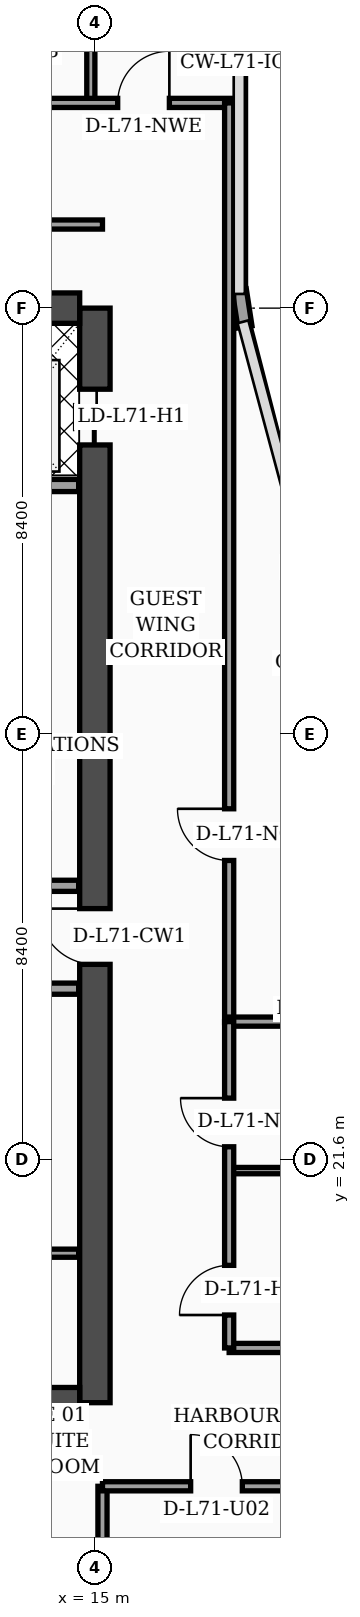
"""IFC4 building model, lengths in metres.
Left out: names, types, materials, properties, quantities, classifications, styles, units other than length and angle.
Written with IfcOpenShell. Run it as: python <this file> out.ifc"""

import sys

from ifc_helpers import new_model, si_unit, direction, frame, frame_2d, origin, place, context, subcontext, project, spatial, rectangle, extrude, element, fill, save


model = new_model("IFC4")
c1 = context("Model", 3, precision=1e-05, world=origin(), true_north=direction((0.0, 1.0)))
c2 = subcontext(c1, "Body", "Model", "MODEL_VIEW")
j1 = project(units=[si_unit("LENGTHUNIT", "METRE"), si_unit("PLANEANGLEUNIT", "RADIAN")], contexts=[c1])
p1 = place(None, origin())
s1 = spatial("IfcSite", under=j1, at=p1, CompositionType="ELEMENT")
p2 = place(p1, origin())
s2 = spatial("IfcBuilding", under=s1, at=p2, CompositionType="ELEMENT")
p3 = place(p2, frame((0.0, 0.0, 287.3)))
s3 = spatial("IfcBuildingStorey", under=s2, at=p3, CompositionType="ELEMENT", Elevation=287.3)
p4 = place(p3, frame((15.0, 16.8, 0.0), z_axis=(0.0, 0.0, 1.0), x_axis=(0.0, 1.0, 0.0)))
e1 = element("IfcWall", 1, at=p4, inside=s3, PredefinedType="SHEAR", context=c2, shape_type="SweptSolid", body=[
    extrude(rectangle(XDim=21.6, YDim=0.6, at=frame_2d((10.8, 0.0))), origin(), (0.0, 0.0, 1.0), 3.56),
])
p5 = place(p4, frame((8.65, 0.0, 0.0)))
e2 = element("IfcOpeningElement", 2, at=p5, cuts=e1, PredefinedType="OPENING", context=c2, shape_type="SweptSolid", body=[
    extrude(rectangle(XDim=1.1, YDim=2.2, at=frame_2d((0.55, 1.1))), frame((0.0, 0.31, 0.0), z_axis=(0.0, -1.0, 0.0), x_axis=(1.0, 0.0, 0.0)), (0.0, 0.0, 1.0), 0.62),
])
p6 = place(p4, frame((18.9, 0.0, 0.0)))
e3 = element("IfcOpeningElement", 3, at=p6, cuts=e1, PredefinedType="OPENING", context=c2, shape_type="SweptSolid", body=[
    extrude(rectangle(XDim=1.1, YDim=2.2, at=frame_2d((0.55, 1.1))), frame((0.0, 0.31, 0.0), z_axis=(0.0, -1.0, 0.0), x_axis=(1.0, 0.0, 0.0)), (0.0, 0.0, 1.0), 0.62),
])
p7 = place(p3, frame((4.5, 38.4, 0.0), z_axis=(0.0, 0.0, 1.0), x_axis=(1.0, 0.0, 0.0)))
e4 = element("IfcWall", 4, at=p7, inside=s3, PredefinedType="SHEAR", context=c2, shape_type="SweptSolid", body=[
    extrude(rectangle(XDim=10.2, YDim=0.6, at=frame_2d((5.1, 0.0))), origin(), (0.0, 0.0, 1.0), 3.56),
])
p8 = place(p7, frame((5.8, 0.0, 0.0)))
e5 = element("IfcOpeningElement", 5, at=p8, cuts=e4, PredefinedType="OPENING", context=c2, shape_type="SweptSolid", body=[
    extrude(rectangle(XDim=1.1, YDim=2.2, at=frame_2d((0.55, 1.1))), frame((0.0, 0.31, 0.0), z_axis=(0.0, -1.0, 0.0), x_axis=(1.0, 0.0, 0.0)), (0.0, 0.0, 1.0), 0.62),
])
p9 = place(p3, frame((4.5, 16.8, 0.0), z_axis=(0.0, 0.0, 1.0), x_axis=(1.0, 0.0, 0.0)))
e6 = element("IfcWall", 6, at=p9, inside=s3, PredefinedType="SHEAR", context=c2, shape_type="SweptSolid", body=[
    extrude(rectangle(XDim=10.2, YDim=0.6, at=frame_2d((5.1, 0.0))), origin(), (0.0, 0.0, 1.0), 3.56),
])
p10 = place(p3, frame((17.962, 38.03, 0.0), z_axis=(0.0, 0.0, 1.0), x_axis=(-0.15141125477, 0.988470855377, 0.0)))
e7 = element("IfcWall", 7, at=p10, inside=s3, PredefinedType="SOLIDWALL", context=c2, shape_type="SweptSolid", body=[
    extrude(rectangle(XDim=0.739, YDim=0.28, at=frame_2d((0.369, 0.0))), origin(), (0.0, 0.0, 1.0), 3.56),
])
p11 = place(p3, frame((9.68, 19.75, 0.0), z_axis=(0.0, 0.0, 1.0), x_axis=(1.0, 0.0, 0.0)))
e8 = element("IfcWall", 8, at=p11, inside=s3, PredefinedType="PARTITIONING", context=c2, shape_type="SweptSolid", body=[
    extrude(rectangle(XDim=5.0, YDim=0.16, at=frame_2d((2.5, 0.0))), origin(), (0.0, 0.0, 1.0), 3.56),
])
p12 = place(p11, frame((1.1, 0.0, 0.0)))
e9 = element("IfcOpeningElement", 9, at=p12, cuts=e8, PredefinedType="OPENING", context=c2, shape_type="SweptSolid", body=[
    extrude(rectangle(XDim=0.98, YDim=2.15, at=frame_2d((0.49, 1.075))), frame((0.0, 0.09, 0.0), z_axis=(0.0, -1.0, 0.0), x_axis=(1.0, 0.0, 0.0)), (0.0, 0.0, 1.0), 0.18),
])
p13 = place(p3, frame((9.68, 24.97, 0.0), z_axis=(0.0, 0.0, 1.0), x_axis=(1.0, 0.0, 0.0)))
e10 = element("IfcWall", 10, at=p13, inside=s3, PredefinedType="SOLIDWALL", context=c2, shape_type="SweptSolid", body=[
    extrude(rectangle(XDim=5.0, YDim=0.22, at=frame_2d((2.5, 0.0))), origin(), (0.0, 0.0, 1.0), 2.99),
])
p14 = place(p13, frame((0.9, 0.0, 0.0)))
e11 = element("IfcOpeningElement", 11, at=p14, cuts=e10, PredefinedType="OPENING", context=c2, shape_type="SweptSolid", body=[
    extrude(rectangle(XDim=0.98, YDim=2.15, at=frame_2d((0.49, 1.075))), frame((0.0, 0.12, 0.0), z_axis=(0.0, -1.0, 0.0), x_axis=(1.0, 0.0, 0.0)), (0.0, 0.0, 1.0), 0.24),
])
p15 = place(p3, frame((12.25, 27.0, 0.0), z_axis=(0.0, 0.0, 1.0), x_axis=(1.0, 0.0, 0.0)))
e12 = element("IfcWall", 12, at=p15, inside=s3, PredefinedType="SOLIDWALL", context=c2, shape_type="SweptSolid", body=[
    extrude(rectangle(XDim=2.43, YDim=0.22, at=frame_2d((1.215, 0.0))), origin(), (0.0, 0.0, 1.0), 3.56),
])
p16 = place(p3, frame((12.25, 29.8, 0.0), z_axis=(0.0, 0.0, 1.0), x_axis=(1.0, 0.0, 0.0)))
e13 = element("IfcWall", 13, at=p16, inside=s3, PredefinedType="PARTITIONING", context=c2, shape_type="SweptSolid", body=[
    extrude(rectangle(XDim=2.43, YDim=0.16, at=frame_2d((1.215, 0.0))), origin(), (0.0, 0.0, 1.0), 3.56),
])
p17 = place(p16, frame((0.55, 0.0, 0.0)))
e14 = element("IfcOpeningElement", 14, at=p17, cuts=e13, PredefinedType="OPENING", context=c2, shape_type="SweptSolid", body=[
    extrude(rectangle(XDim=0.98, YDim=2.15, at=frame_2d((0.49, 1.075))), frame((0.0, 0.09, 0.0), z_axis=(0.0, -1.0, 0.0), x_axis=(1.0, 0.0, 0.0)), (0.0, 0.0, 1.0), 0.18),
])
p18 = place(p3, frame((9.66, 34.9, 0.0), z_axis=(0.0, 0.0, 1.0), x_axis=(1.0, 0.0, 0.0)))
e15 = element("IfcWall", 15, at=p18, inside=s3, PredefinedType="SOLIDWALL", context=c2, shape_type="SweptSolid", body=[
    extrude(rectangle(XDim=5.02, YDim=0.24, at=frame_2d((2.51, 0.0))), origin(), (0.0, 0.0, 1.0), 3.56),
])
p19 = place(p3, frame((15.15, 2.44, 0.0), z_axis=(0.0, 0.0, 1.0), x_axis=(0.0, 1.0, 0.0)))
e16 = element("IfcWall", 16, at=p19, inside=s3, PredefinedType="PARTITIONING", context=c2, shape_type="SweptSolid", body=[
    extrude(rectangle(XDim=12.71, YDim=0.18, at=frame_2d((6.355, 0.0))), origin(), (0.0, 0.0, 1.0), 3.09),
])
p20 = place(p3, frame((15.15, 15.15, 0.0), z_axis=(0.0, 0.0, 1.0), x_axis=(1.0, 0.0, 0.0)))
e17 = element("IfcWall", 17, at=p20, inside=s3, PredefinedType="PARTITIONING", context=c2, shape_type="SweptSolid", body=[
    extrude(rectangle(XDim=6.45, YDim=0.18, at=frame_2d((3.225, 0.0))), origin(), (0.0, 0.0, 1.0), 2.59),
])
p21 = place(p20, frame((1.74, 0.0, 0.0)))
e18 = element("IfcOpeningElement", 18, at=p21, cuts=e17, PredefinedType="OPENING", context=c2, shape_type="SweptSolid", body=[
    extrude(rectangle(XDim=1.02, YDim=2.2, at=frame_2d((0.51, 1.1))), frame((0.0, 0.1, 0.0), z_axis=(0.0, -1.0, 0.0), x_axis=(1.0, 0.0, 0.0)), (0.0, 0.0, 1.0), 0.2),
])
p22 = place(p3, frame((14.92, 42.45, 0.0), z_axis=(0.0, 0.0, 1.0), x_axis=(0.0, 1.0, 0.0)))
e19 = element("IfcWall", 19, at=p22, inside=s3, PredefinedType="PARTITIONING", context=c2, shape_type="SweptSolid", body=[
    extrude(rectangle(XDim=5.35, YDim=0.16, at=frame_2d((2.675, 0.0))), origin(), (0.0, 0.0, 1.0), 3.09),
])
p23 = place(p3, frame((0.08, 42.45, 0.0), z_axis=(0.0, 0.0, 1.0), x_axis=(1.0, 0.0, 0.0)))
e20 = element("IfcWall", 20, at=p23, inside=s3, PredefinedType="PARTITIONING", context=c2, shape_type="SweptSolid", body=[
    extrude(rectangle(XDim=17.77, YDim=0.18, at=frame_2d((8.885, 0.0))), origin(), (0.0, 0.0, 1.0), 2.99),
])
p24 = place(p23, frame((0.9, 0.0, 0.0)))
e21 = element("IfcOpeningElement", 21, at=p24, cuts=e20, PredefinedType="OPENING", context=c2, shape_type="SweptSolid", body=[
    extrude(rectangle(XDim=1.02, YDim=2.2, at=frame_2d((0.51, 1.1))), frame((0.0, 0.1, 0.0), z_axis=(0.0, -1.0, 0.0), x_axis=(1.0, 0.0, 0.0)), (0.0, 0.0, 1.0), 0.2),
])
p25 = place(p23, frame((7.38, 0.0, 0.0)))
e22 = element("IfcOpeningElement", 22, at=p25, cuts=e20, PredefinedType="OPENING", context=c2, shape_type="SweptSolid", body=[
    extrude(rectangle(XDim=1.02, YDim=2.2, at=frame_2d((0.51, 1.1))), frame((0.0, 0.1, 0.0), z_axis=(0.0, -1.0, 0.0), x_axis=(1.0, 0.0, 0.0)), (0.0, 0.0, 1.0), 0.2),
])
p26 = place(p23, frame((15.37, 0.0, 0.0)))
e23 = element("IfcOpeningElement", 23, at=p26, cuts=e20, PredefinedType="OPENING", context=c2, shape_type="SweptSolid", body=[
    extrude(rectangle(XDim=1.02, YDim=2.2, at=frame_2d((0.51, 1.1))), frame((0.0, 0.1, 0.0), z_axis=(0.0, -1.0, 0.0), x_axis=(1.0, 0.0, 0.0)), (0.0, 0.0, 1.0), 0.2),
])
p27 = place(p3, frame((17.65, 24.3, 0.0), z_axis=(0.0, 0.0, 1.0), x_axis=(0.0, 1.0, 0.0)))
e24 = element("IfcWall", 24, at=p27, inside=s3, PredefinedType="PARTITIONING", context=c2, shape_type="SweptSolid", body=[
    extrude(rectangle(XDim=18.15, YDim=0.18, at=frame_2d((9.075, 0.0))), origin(), (0.0, 0.0, 1.0), 2.99),
])
p28 = place(p27, frame((3.2, 0.0, 0.0)))
e25 = element("IfcOpeningElement", 25, at=p28, cuts=e24, PredefinedType="OPENING", context=c2, shape_type="SweptSolid", body=[
    extrude(rectangle(XDim=1.02, YDim=2.2, at=frame_2d((0.51, 1.1))), frame((0.0, 0.1, 0.0), z_axis=(0.0, -1.0, 0.0), x_axis=(1.0, 0.0, 0.0)), (0.0, 0.0, 1.0), 0.2),
])
p29 = place(p3, frame((3.88, 40.05, 0.0), z_axis=(0.0, 0.0, 1.0), x_axis=(1.0, 0.0, 0.0)))
e26 = element("IfcWall", 26, at=p29, inside=s3, PredefinedType="PARTITIONING", context=c2, shape_type="SweptSolid", body=[
    extrude(rectangle(XDim=11.27, YDim=0.18, at=frame_2d((5.635, 0.0))), origin(), (0.0, 0.0, 1.0), 2.99),
])
p30 = place(p3, frame((17.65, 17.88, 0.0), z_axis=(0.0, 0.0, 1.0), x_axis=(1.0, 0.0, 0.0)))
e27 = element("IfcWall", 27, at=p30, inside=s3, PredefinedType="PARTITIONING", context=c2, shape_type="SweptSolid", body=[
    extrude(rectangle(XDim=3.9, YDim=0.18, at=frame_2d((1.95, 0.0))), origin(), (0.0, 0.0, 1.0), 3.56),
])
p31 = place(p3, frame((17.65, 21.38, 0.0), z_axis=(0.0, 0.0, 1.0), x_axis=(1.0, 0.0, 0.0)))
e28 = element("IfcWall", 28, at=p31, inside=s3, PredefinedType="PARTITIONING", context=c2, shape_type="SweptSolid", body=[
    extrude(rectangle(XDim=3.9, YDim=0.125, at=frame_2d((1.95, 0.0))), origin(), (0.0, 0.0, 1.0), 3.56),
])
p32 = place(p3, frame((17.65, 24.32, 0.0), z_axis=(0.0, 0.0, 1.0), x_axis=(1.0, 0.0, 0.0)))
e29 = element("IfcWall", 29, at=p32, inside=s3, PredefinedType="PARTITIONING", context=c2, shape_type="SweptSolid", body=[
    extrude(rectangle(XDim=3.95, YDim=0.18, at=frame_2d((1.975, 0.0))), origin(), (0.0, 0.0, 1.0), 3.56),
])
p33 = place(p3, frame((17.65, 17.88, 0.0), z_axis=(0.0, 0.0, 1.0), x_axis=(0.0, 1.0, 0.0)))
e30 = element("IfcWall", 30, at=p33, inside=s3, PredefinedType="PARTITIONING", context=c2, shape_type="SweptSolid", body=[
    extrude(rectangle(XDim=6.44, YDim=0.18, at=frame_2d((3.22, 0.0))), origin(), (0.0, 0.0, 1.0), 3.56),
])
p34 = place(p33, frame((0.65, 0.0, 0.0)))
e31 = element("IfcOpeningElement", 31, at=p34, cuts=e30, PredefinedType="OPENING", context=c2, shape_type="SweptSolid", body=[
    extrude(rectangle(XDim=0.98, YDim=2.15, at=frame_2d((0.49, 1.075))), frame((0.0, 0.1, 0.0), z_axis=(0.0, -1.0, 0.0), x_axis=(1.0, 0.0, 0.0)), (0.0, 0.0, 1.0), 0.2),
])
p35 = place(p33, frame((3.97, 0.0, 0.0)))
e32 = element("IfcOpeningElement", 32, at=p35, cuts=e30, PredefinedType="OPENING", context=c2, shape_type="SweptSolid", body=[
    extrude(rectangle(XDim=0.96, YDim=2.2, at=frame_2d((0.48, 1.1))), frame((0.0, 0.1, 0.0), z_axis=(0.0, -1.0, 0.0), x_axis=(1.0, 0.0, 0.0)), (0.0, 0.0, 1.0), 0.2),
])
p36 = place(p21, origin())
e33 = element("IfcDoor", 33, at=p36, inside=s3, OperationType="SINGLE_SWING_LEFT", PredefinedType="DOOR", context=c2, shape_type="SweptSolid", body=[
    extrude(rectangle(XDim=1.02, YDim=2.2, at=frame_2d((0.51, 1.1))), frame((0.0, 0.025, 0.0), z_axis=(0.0, -1.0, 0.0), x_axis=(1.0, 0.0, 0.0)), (0.0, 0.0, 1.0), 0.05),
])
fill(e18, e33)
p37 = place(p26, origin())
e34 = element("IfcDoor", 34, at=p37, inside=s3, OperationType="SINGLE_SWING_RIGHT", PredefinedType="DOOR", context=c2, shape_type="SweptSolid", body=[
    extrude(rectangle(XDim=1.02, YDim=2.2, at=frame_2d((0.51, 1.1))), frame((0.0, 0.025, 0.0), z_axis=(0.0, -1.0, 0.0), x_axis=(1.0, 0.0, 0.0)), (0.0, 0.0, 1.0), 0.05),
])
fill(e23, e34)
p38 = place(p28, origin())
e35 = element("IfcDoor", 35, at=p38, inside=s3, OperationType="SINGLE_SWING_RIGHT", PredefinedType="DOOR", context=c2, shape_type="SweptSolid", body=[
    extrude(rectangle(XDim=1.02, YDim=2.2, at=frame_2d((0.51, 1.1))), frame((0.0, 0.025, 0.0), z_axis=(0.0, -1.0, 0.0), x_axis=(1.0, 0.0, 0.0)), (0.0, 0.0, 1.0), 0.05),
])
fill(e25, e35)
p39 = place(p34, origin())
e36 = element("IfcDoor", 36, at=p39, inside=s3, OperationType="SINGLE_SWING_LEFT", PredefinedType="DOOR", context=c2, shape_type="SweptSolid", body=[
    extrude(rectangle(XDim=0.98, YDim=2.15, at=frame_2d((0.49, 1.075))), frame((0.0, 0.025, 0.0), z_axis=(0.0, -1.0, 0.0), x_axis=(1.0, 0.0, 0.0)), (0.0, 0.0, 1.0), 0.05),
])
fill(e31, e36)
p40 = place(p35, origin())
e37 = element("IfcDoor", 37, at=p40, inside=s3, OperationType="SINGLE_SWING_RIGHT", PredefinedType="DOOR", context=c2, shape_type="SweptSolid", body=[
    extrude(rectangle(XDim=0.96, YDim=2.2, at=frame_2d((0.48, 1.1))), frame((0.0, 0.025, 0.0), z_axis=(0.0, -1.0, 0.0), x_axis=(1.0, 0.0, 0.0)), (0.0, 0.0, 1.0), 0.05),
])
fill(e32, e37)
p41 = place(p5, origin())
e38 = element("IfcDoor", 38, at=p41, inside=s3, OperationType="SINGLE_SWING_RIGHT", PredefinedType="DOOR", context=c2, shape_type="SweptSolid", body=[
    extrude(rectangle(XDim=1.1, YDim=2.2, at=frame_2d((0.55, 1.1))), frame((0.0, 0.025, 0.0), z_axis=(0.0, -1.0, 0.0), x_axis=(1.0, 0.0, 0.0)), (0.0, 0.0, 1.0), 0.05),
])
fill(e2, e38)
p42 = place(p6, origin())
e39 = element("IfcDoor", 39, at=p42, inside=s3, OperationType="DOUBLE_DOOR_SLIDING", PredefinedType="DOOR", context=c2, shape_type="SweptSolid", body=[
    extrude(rectangle(XDim=1.1, YDim=2.2, at=frame_2d((0.55, 1.1))), frame((0.0, 0.025, 0.0), z_axis=(0.0, -1.0, 0.0), x_axis=(1.0, 0.0, 0.0)), (0.0, 0.0, 1.0), 0.05),
])
fill(e3, e39)
save(model, sys.argv[1])
